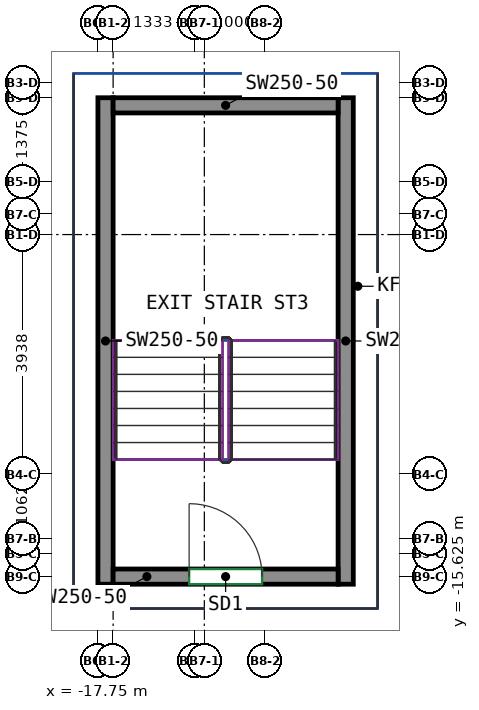
"""IFC4 building model, lengths in metres.
Left out: names, types, materials, properties, quantities, classifications, styles, units other than length and angle.
Written with IfcOpenShell. Run it as: python <this file> out.ifc"""

import sys

from ifc_helpers import new_model, si_unit, direction, frame, frame_2d, origin, place, context, subcontext, project, spatial, rectangle, extrude, source, transform, mapped, element, fill, save


model = new_model("IFC4")
c1 = context("Model", 3, precision=1e-05, world=origin(), true_north=direction((0.0, 1.0)))
c2 = subcontext(c1, "Body", "Model", "MODEL_VIEW")
j1 = project(units=[si_unit("LENGTHUNIT", "METRE"), si_unit("PLANEANGLEUNIT", "RADIAN")], contexts=[c1])
p1 = place(None, origin())
s1 = spatial("IfcSite", under=j1, at=p1, CompositionType="ELEMENT")
p2 = place(p1, origin())
s2 = spatial("IfcBuilding", under=s1, at=p2, CompositionType="ELEMENT")
p3 = place(p2, frame((0.0, 0.0, 318.8)))
s3 = spatial("IfcBuildingStorey", under=s2, at=p3, CompositionType="ELEMENT", Elevation=318.8)
m1 = source(origin(), c2, "Body", "SweptSolid", [
    extrude(rectangle(XDim=8.0, YDim=0.25, at=frame_2d((4.0, 0.0))), origin(), (0.0, 0.0, 1.0), 5.0),
])
for number, where, z_axis, x_axis in (
    (1, (-17.625, -15.75, -0.4), (0.0, 0.0, 1.0), (0.0, 1.0, 0.0)),
    (2, (-13.675, -15.75, -0.4), (0.0, 0.0, 1.0), (0.0, 1.0, 0.0)),
):
    element("IfcWall", number, at=place(p3, frame(where, z_axis=z_axis, x_axis=x_axis)), inside=s3, PredefinedType="SHEAR", context=c2, shape_type="MappedRepresentation", body=[
        mapped(m1, transform((0.0, 0.0, 0.0))),
    ])
m2 = source(origin(), c2, "Body", "SweptSolid", [
    extrude(rectangle(XDim=3.7, YDim=0.25, at=frame_2d((1.85, 0.0))), origin(), (0.0, 0.0, 1.0), 5.0),
])
p4 = place(p3, frame((-17.5, -15.625, -0.4), z_axis=(0.0, 0.0, 1.0), x_axis=(1.0, 0.0, 0.0)))
e3 = element("IfcWall", 3, at=p4, inside=s3, PredefinedType="SHEAR", context=c2, shape_type="MappedRepresentation", body=[
    mapped(m2, transform((0.0, 0.0, 0.0))),
])
p5 = place(p4, frame((1.25, 0.0, 0.4)))
e4 = element("IfcOpeningElement", 4, at=p5, cuts=e3, PredefinedType="OPENING", context=c2, shape_type="SweptSolid", body=[
    extrude(rectangle(XDim=1.2, YDim=2.1, at=frame_2d((0.6, 1.05))), frame((0.0, 0.135, 0.0), z_axis=(0.0, -1.0, 0.0), x_axis=(1.0, 0.0, 0.0)), (0.0, 0.0, 1.0), 0.27),
])
p6 = place(p3, frame((-17.5, -7.875, -0.4), z_axis=(0.0, 0.0, 1.0), x_axis=(1.0, 0.0, 0.0)))
e5 = element("IfcWall", 5, at=p6, inside=s3, PredefinedType="SHEAR", context=c2, shape_type="MappedRepresentation", body=[
    mapped(m2, transform((0.0, 0.0, 0.0))),
])
p7 = place(p5, origin())
e6 = element("IfcDoor", 6, at=p7, inside=s3, OperationType="DOUBLE_DOOR_SINGLE_SWING", PredefinedType="DOOR", context=c2, shape_type="SweptSolid", body=[
    extrude(rectangle(XDim=1.2, YDim=2.1, at=frame_2d((0.6, 1.05))), frame((0.0, 0.025, 0.0), z_axis=(0.0, -1.0, 0.0), x_axis=(1.0, 0.0, 0.0)), (0.0, 0.0, 1.0), 0.05),
])
fill(e4, e6)
save(model, sys.argv[1])
